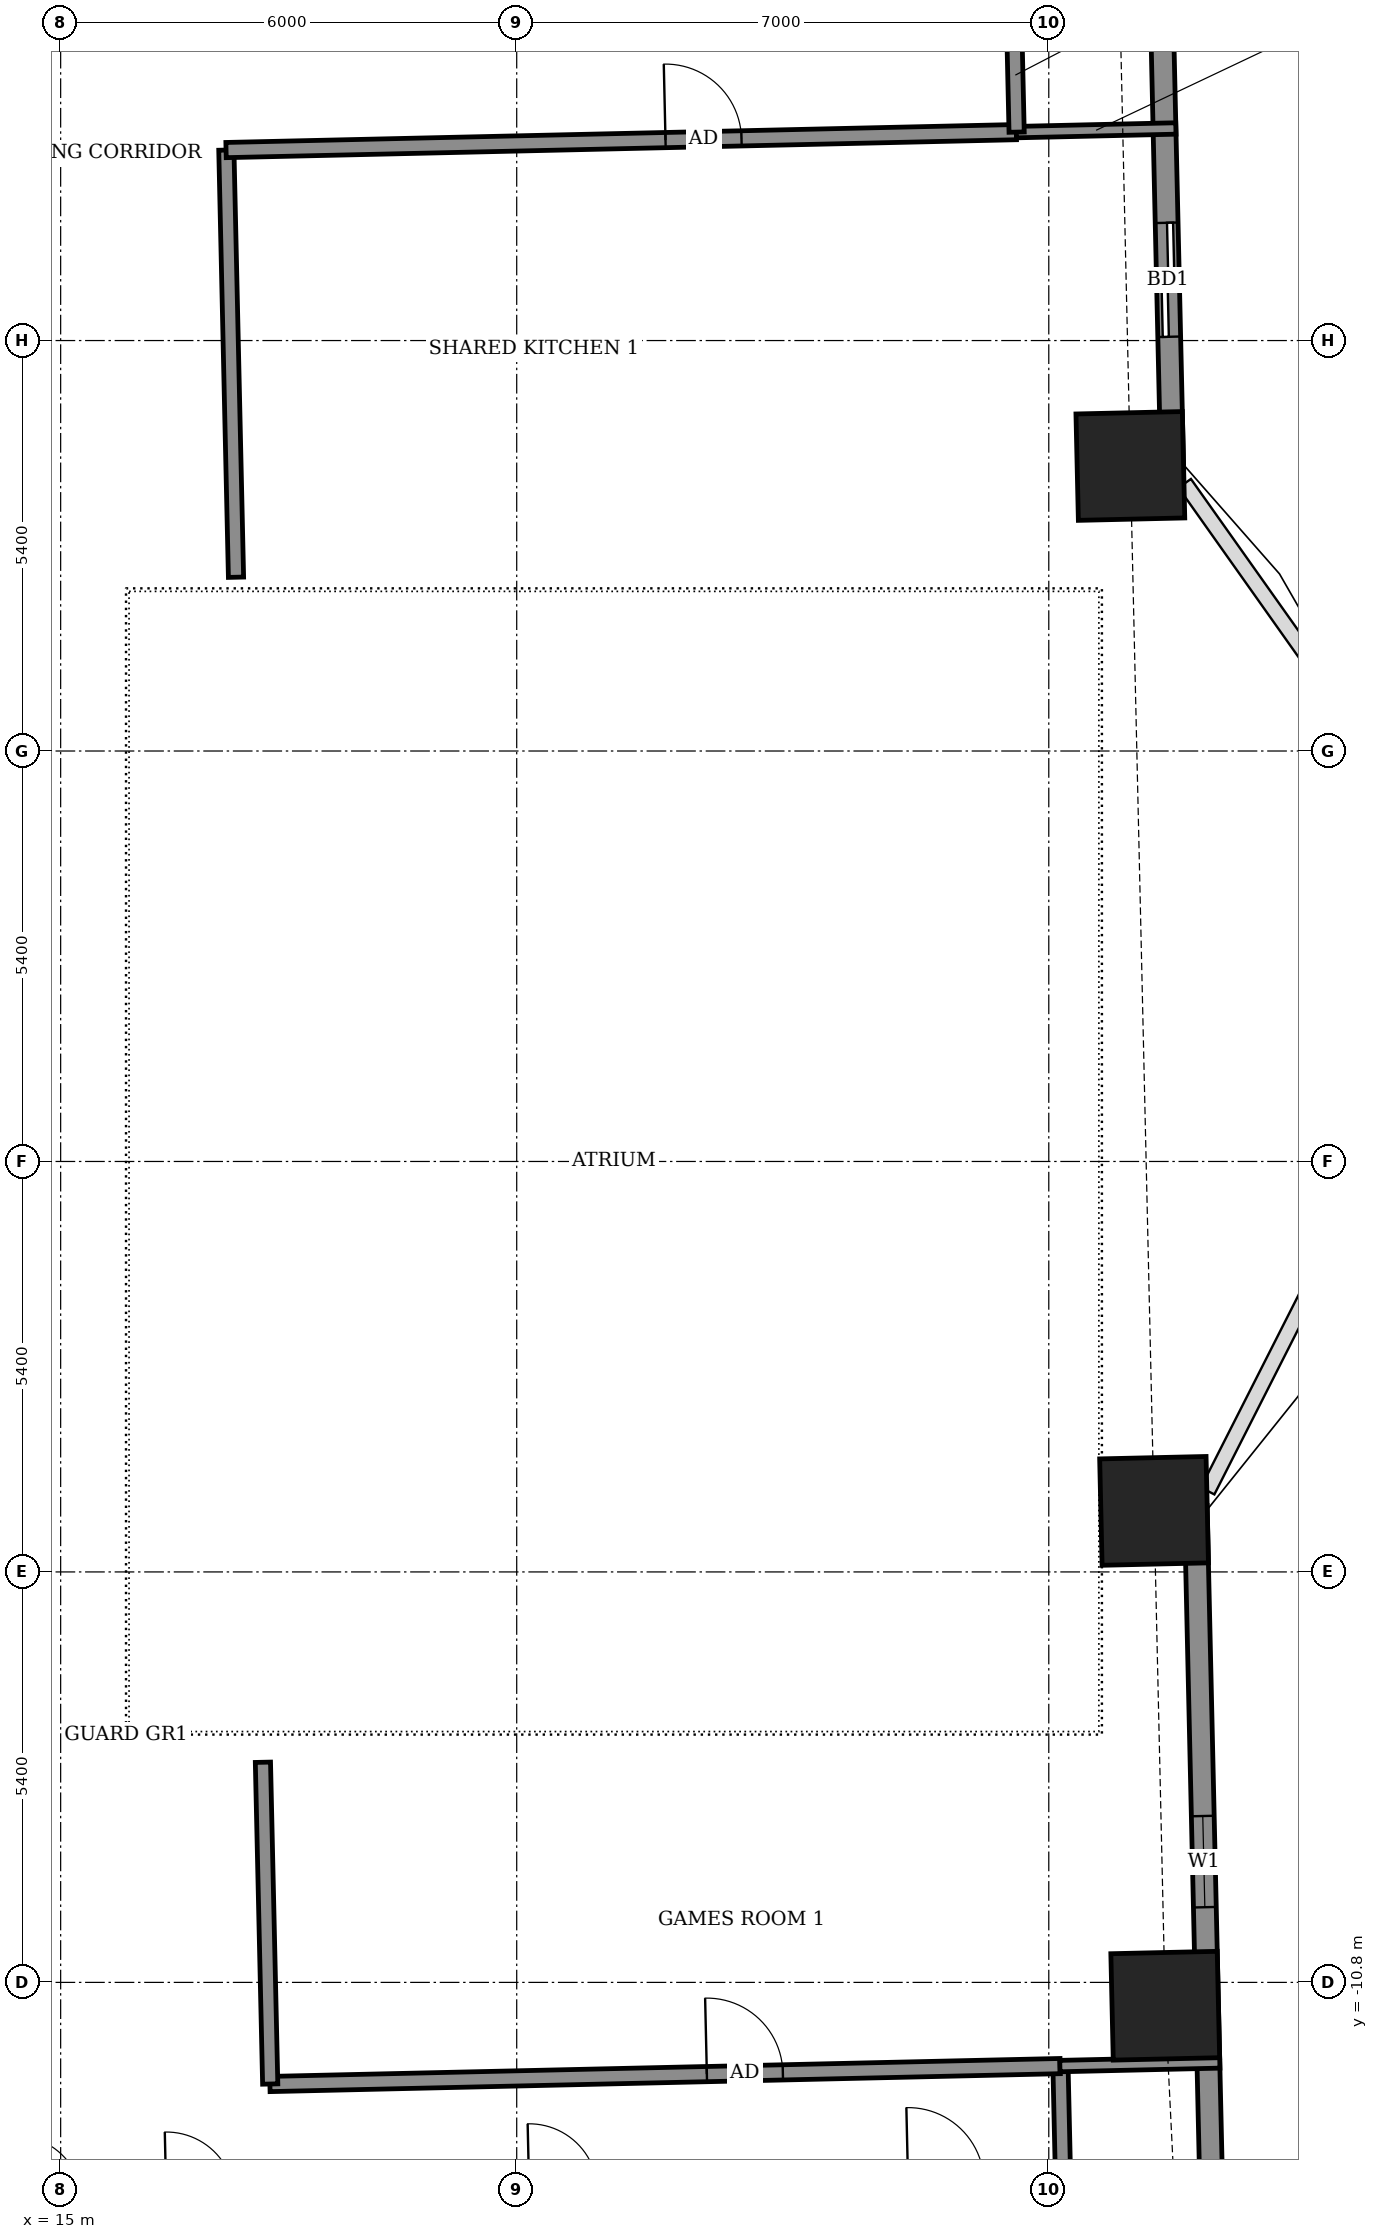
"""IFC4 building model, lengths in metres.
Left out: names, types, materials, properties, quantities, classifications, styles, units other than length and angle.
Written with IfcOpenShell. Run it as: python <this file> out.ifc"""

import sys

from ifc_helpers import new_model, si_unit, direction, frame, frame_2d, origin, origin_2d, place, context, subcontext, project, spatial, rectangle, extrude, element, fill, save


model = new_model("IFC4")
c1 = context("Model", 3, precision=1e-05, world=origin(), true_north=direction((0.0, 1.0)))
c2 = subcontext(c1, "Body", "Model", "MODEL_VIEW")
j1 = project(units=[si_unit("LENGTHUNIT", "METRE"), si_unit("PLANEANGLEUNIT", "RADIAN")], contexts=[c1])
p1 = place(None, origin())
s1 = spatial("IfcSite", under=j1, at=p1, CompositionType="ELEMENT")
p2 = place(p1, origin())
s2 = spatial("IfcBuilding", under=s1, at=p2, CompositionType="ELEMENT")
p3 = place(p2, frame((0.0, 0.0, 90.1)))
s3 = spatial("IfcBuildingStorey", under=s2, at=p3, CompositionType="ELEMENT", Elevation=90.1)
for number, where, z_axis, x_axis in (
    (1, (29.532, -11.107, -0.55), (0.0, 0.0, 1.0), (-0.023, 1.0, 0.0)),
    (2, (29.385, -4.597, -0.55), (0.0, 0.0, 1.0), (-0.023, 1.0, 0.0)),
    (3, (29.073, 9.15, -0.55), (0.0, 0.0, 1.0), (-0.023, 1.0, 0.0)),
):
    element("IfcColumn", number, at=place(p3, frame(where, z_axis=z_axis, x_axis=x_axis)), inside=s3, PredefinedType="COLUMN", context=c2, shape_type="SweptSolid", body=[
        extrude(rectangle(XDim=1.4, YDim=1.4, at=origin_2d()), origin(), (0.0, 0.0, 1.0), 3.6),
    ])
p4 = place(p3, frame((30.227, -17.455, 0.0), z_axis=(0.0, 0.0, 1.0), x_axis=(-0.022734702163, 0.999741533256, 0.0)))
e4 = element("IfcWall", 4, at=p4, inside=s3, PredefinedType="SOLIDWALL", context=c2, shape_type="SweptSolid", body=[
    extrude(rectangle(XDim=12.929, YDim=0.3, at=frame_2d((6.465, 0.0))), origin(), (0.0, 0.0, 1.0), 3.05),
])
p5 = place(p4, frame((2.566, 0.0, 0.0)))
e5 = element("IfcOpeningElement", 5, at=p5, cuts=e4, PredefinedType="OPENING", context=c2, shape_type="SweptSolid", body=[
    extrude(rectangle(XDim=1.5, YDim=2.4, at=frame_2d((0.75, 1.2))), frame((0.0, 0.16, 0.0), z_axis=(0.0, -1.0, 0.0), x_axis=(1.0, 0.0, 0.0)), (0.0, 0.0, 1.0), 0.32),
])
p6 = place(p4, frame((7.646, 0.0, 0.9)))
e6 = element("IfcOpeningElement", 6, at=p6, cuts=e4, PredefinedType="OPENING", context=c2, shape_type="SweptSolid", body=[
    extrude(rectangle(XDim=1.2, YDim=1.5, at=frame_2d((0.6, 0.75))), frame((0.0, 0.16, 0.0), z_axis=(0.0, -1.0, 0.0), x_axis=(1.0, 0.0, 0.0)), (0.0, 0.0, 1.0), 0.32),
])
p7 = place(p3, frame((29.624, 9.108, 0.0), z_axis=(0.0, 0.0, 1.0), x_axis=(-0.022679601751, 0.999742784752, 0.0)))
e7 = element("IfcWall", 7, at=p7, inside=s3, PredefinedType="SOLIDWALL", context=c2, shape_type="SweptSolid", body=[
    extrude(rectangle(XDim=13.93, YDim=0.3, at=frame_2d((6.965, 0.0))), origin(), (0.0, 0.0, 1.0), 3.05),
])
p8 = place(p7, frame((1.742, 0.0, 0.0)))
e8 = element("IfcOpeningElement", 8, at=p8, cuts=e7, PredefinedType="OPENING", context=c2, shape_type="SweptSolid", body=[
    extrude(rectangle(XDim=1.5, YDim=2.4, at=frame_2d((0.75, 1.2))), frame((0.0, 0.16, 0.0), z_axis=(0.0, -1.0, 0.0), x_axis=(1.0, 0.0, 0.0)), (0.0, 0.0, 1.0), 0.32),
])
p9 = place(p7, frame((9.054, 0.0, 0.9)))
e9 = element("IfcOpeningElement", 9, at=p9, cuts=e7, PredefinedType="OPENING", context=c2, shape_type="SweptSolid", body=[
    extrude(rectangle(XDim=2.4, YDim=1.5, at=frame_2d((1.2, 0.75))), frame((0.0, 0.16, 0.0), z_axis=(0.0, -1.0, 0.0), x_axis=(1.0, 0.0, 0.0)), (0.0, 0.0, 1.0), 0.32),
])
p10 = place(p3, frame((28.188, -13.401, 0.0), z_axis=(0.0, 0.0, 1.0), x_axis=(-0.022617910375, 0.999744182344, 0.0)))
e10 = element("IfcWall", 10, at=p10, inside=s3, PredefinedType="PARTITIONING", context=c2, shape_type="SweptSolid", body=[
    extrude(rectangle(XDim=1.5, YDim=0.2, at=frame_2d((0.75, 0.0))), origin(), (0.0, 0.0, 1.0), 3.05),
])
p11 = place(p3, frame((17.753, -12.137, 0.0), z_axis=(0.0, 0.0, 1.0), x_axis=(0.999742295888, 0.022701141223, 0.0)))
e11 = element("IfcWall", 11, at=p11, inside=s3, PredefinedType="PARTITIONING", context=c2, shape_type="SweptSolid", body=[
    extrude(rectangle(XDim=10.4, YDim=0.2, at=frame_2d((5.2, 0.0))), origin(), (0.0, 0.0, 1.0), 3.05),
])
p12 = place(p11, frame((5.75, 0.0, 0.0)))
e12 = element("IfcOpeningElement", 12, at=p12, cuts=e11, PredefinedType="OPENING", context=c2, shape_type="SweptSolid", body=[
    extrude(rectangle(XDim=1.0, YDim=2.1, at=frame_2d((0.5, 1.05))), frame((0.0, 0.11, 0.0), z_axis=(0.0, -1.0, 0.0), x_axis=(1.0, 0.0, 0.0)), (0.0, 0.0, 1.0), 0.22),
])
p13 = place(p3, frame((17.757, -12.137, 0.0), z_axis=(0.0, 0.0, 1.0), x_axis=(-0.022718785711, 0.999741895079, 0.0)))
e13 = element("IfcWall", 13, at=p13, inside=s3, PredefinedType="PARTITIONING", context=c2, shape_type="SweptSolid", body=[
    extrude(rectangle(XDim=4.234, YDim=0.2, at=frame_2d((2.117, 0.0))), origin(), (0.0, 0.0, 1.0), 3.05),
])
p14 = place(p3, frame((28.146, -11.901, 0.0), z_axis=(0.0, 0.0, 1.0), x_axis=(0.999741476082, 0.022737216212, 0.0)))
e14 = element("IfcWall", 14, at=p14, inside=s3, PredefinedType="PARTITIONING", context=c2, shape_type="SweptSolid", body=[
    extrude(rectangle(XDim=2.104, YDim=0.15, at=frame_2d((1.052, 0.0))), origin(), (0.0, 0.0, 1.0), 2.55),
])
p15 = place(p3, frame((17.307, 7.686, 0.0), z_axis=(0.0, 0.0, 1.0), x_axis=(-0.022584272568, 0.999744942789, 0.0)))
e15 = element("IfcWall", 15, at=p15, inside=s3, PredefinedType="PARTITIONING", context=c2, shape_type="SweptSolid", body=[
    extrude(rectangle(XDim=5.621, YDim=0.2, at=frame_2d((2.811, 0.0))), origin(), (0.0, 0.0, 1.0), 3.05),
])
p16 = place(p3, frame((17.176, 13.306, 0.0), z_axis=(0.0, 0.0, 1.0), x_axis=(0.999742295888, 0.022701141223, 0.0)))
e16 = element("IfcWall", 16, at=p16, inside=s3, PredefinedType="PARTITIONING", context=c2, shape_type="SweptSolid", body=[
    extrude(rectangle(XDim=10.4, YDim=0.2, at=frame_2d((5.2, 0.0))), origin(), (0.0, 0.0, 1.0), 3.05),
])
p17 = place(p16, frame((5.783, 0.0, 0.0)))
e17 = element("IfcOpeningElement", 17, at=p17, cuts=e16, PredefinedType="OPENING", context=c2, shape_type="SweptSolid", body=[
    extrude(rectangle(XDim=1.0, YDim=2.1, at=frame_2d((0.5, 1.05))), frame((0.0, 0.11, 0.0), z_axis=(0.0, -1.0, 0.0), x_axis=(1.0, 0.0, 0.0)), (0.0, 0.0, 1.0), 0.22),
])
p18 = place(p3, frame((27.573, 13.542, 0.0), z_axis=(0.0, 0.0, 1.0), x_axis=(0.999737616439, 0.022906293375, 0.0)))
e18 = element("IfcWall", 18, at=p18, inside=s3, PredefinedType="PARTITIONING", context=c2, shape_type="SweptSolid", body=[
    extrude(rectangle(XDim=2.1, YDim=0.15, at=frame_2d((1.05, 0.0))), origin(), (0.0, 0.0, 1.0), 2.55),
])
p19 = place(p3, frame((27.577, 13.542, 0.0), z_axis=(0.0, 0.0, 1.0), x_axis=(-0.022617910375, 0.999744182344, 0.0)))
e19 = element("IfcWall", 19, at=p19, inside=s3, PredefinedType="PARTITIONING", context=c2, shape_type="SweptSolid", body=[
    extrude(rectangle(XDim=1.5, YDim=0.2, at=frame_2d((0.75, 0.0))), origin(), (0.0, 0.0, 1.0), 3.05),
])
p20 = place(p3, frame((-24.92, 13.851, 0.0), z_axis=(0.0, 0.0, 1.0), x_axis=(0.999742411711, 0.022696039895, 0.0)))
e20 = element("IfcWall", 20, at=p20, inside=s3, PredefinedType="PARTITIONING", context=c2, shape_type="SweptSolid", body=[
    extrude(rectangle(XDim=52.472, YDim=0.2, at=frame_2d((26.236, 0.0))), origin(), (0.0, 0.0, 1.0), 3.05),
])
p21 = place(p20, frame((50.088, 0.0, 0.0)))
e21 = element("IfcOpeningElement", 21, at=p21, cuts=e20, PredefinedType="OPENING", context=c2, shape_type="SweptSolid", body=[
    extrude(rectangle(XDim=1.0, YDim=2.1, at=frame_2d((0.5, 1.05))), frame((0.0, 0.11, 0.0), z_axis=(0.0, -1.0, 0.0), x_axis=(1.0, 0.0, 0.0)), (0.0, 0.0, 1.0), 0.22),
])
p22 = place(p20, frame((45.725, 0.0, 0.0)))
e22 = element("IfcOpeningElement", 22, at=p22, cuts=e20, PredefinedType="OPENING", context=c2, shape_type="SweptSolid", body=[
    extrude(rectangle(XDim=0.9, YDim=2.1, at=frame_2d((0.45, 1.05))), frame((0.0, 0.11, 0.0), z_axis=(0.0, -1.0, 0.0), x_axis=(1.0, 0.0, 0.0)), (0.0, 0.0, 1.0), 0.22),
])
p23 = place(p20, frame((38.975, 0.0, 0.0)))
e23 = element("IfcOpeningElement", 23, at=p23, cuts=e20, PredefinedType="OPENING", context=c2, shape_type="SweptSolid", body=[
    extrude(rectangle(XDim=0.9, YDim=2.1, at=frame_2d((0.45, 1.05))), frame((0.0, 0.11, 0.0), z_axis=(0.0, -1.0, 0.0), x_axis=(1.0, 0.0, 0.0)), (0.0, 0.0, 1.0), 0.22),
])
p24 = place(p20, frame((37.05, 0.0, 0.0)))
e24 = element("IfcOpeningElement", 24, at=p24, cuts=e20, PredefinedType="OPENING", context=c2, shape_type="SweptSolid", body=[
    extrude(rectangle(XDim=0.9, YDim=2.1, at=frame_2d((0.45, 1.05))), frame((0.0, 0.11, 0.0), z_axis=(0.0, -1.0, 0.0), x_axis=(1.0, 0.0, 0.0)), (0.0, 0.0, 1.0), 0.22),
])
p25 = place(p20, frame((30.35, 0.0, 0.0)))
e25 = element("IfcOpeningElement", 25, at=p25, cuts=e20, PredefinedType="OPENING", context=c2, shape_type="SweptSolid", body=[
    extrude(rectangle(XDim=0.9, YDim=2.1, at=frame_2d((0.45, 1.05))), frame((0.0, 0.11, 0.0), z_axis=(0.0, -1.0, 0.0), x_axis=(1.0, 0.0, 0.0)), (0.0, 0.0, 1.0), 0.22),
])
p26 = place(p20, frame((28.4, 0.0, 0.0)))
e26 = element("IfcOpeningElement", 26, at=p26, cuts=e20, PredefinedType="OPENING", context=c2, shape_type="SweptSolid", body=[
    extrude(rectangle(XDim=0.9, YDim=2.1, at=frame_2d((0.45, 1.05))), frame((0.0, 0.11, 0.0), z_axis=(0.0, -1.0, 0.0), x_axis=(1.0, 0.0, 0.0)), (0.0, 0.0, 1.0), 0.22),
])
p27 = place(p20, frame((21.675, 0.0, 0.0)))
e27 = element("IfcOpeningElement", 27, at=p27, cuts=e20, PredefinedType="OPENING", context=c2, shape_type="SweptSolid", body=[
    extrude(rectangle(XDim=0.9, YDim=2.1, at=frame_2d((0.45, 1.05))), frame((0.0, 0.11, 0.0), z_axis=(0.0, -1.0, 0.0), x_axis=(1.0, 0.0, 0.0)), (0.0, 0.0, 1.0), 0.22),
])
p28 = place(p20, frame((19.775, 0.0, 0.0)))
e28 = element("IfcOpeningElement", 28, at=p28, cuts=e20, PredefinedType="OPENING", context=c2, shape_type="SweptSolid", body=[
    extrude(rectangle(XDim=0.9, YDim=2.1, at=frame_2d((0.45, 1.05))), frame((0.0, 0.11, 0.0), z_axis=(0.0, -1.0, 0.0), x_axis=(1.0, 0.0, 0.0)), (0.0, 0.0, 1.0), 0.22),
])
p29 = place(p20, frame((13.0, 0.0, 0.0)))
e29 = element("IfcOpeningElement", 29, at=p29, cuts=e20, PredefinedType="OPENING", context=c2, shape_type="SweptSolid", body=[
    extrude(rectangle(XDim=0.9, YDim=2.1, at=frame_2d((0.45, 1.05))), frame((0.0, 0.11, 0.0), z_axis=(0.0, -1.0, 0.0), x_axis=(1.0, 0.0, 0.0)), (0.0, 0.0, 1.0), 0.22),
])
p30 = place(p20, frame((11.075, 0.0, 0.0)))
e30 = element("IfcOpeningElement", 30, at=p30, cuts=e20, PredefinedType="OPENING", context=c2, shape_type="SweptSolid", body=[
    extrude(rectangle(XDim=0.9, YDim=2.1, at=frame_2d((0.45, 1.05))), frame((0.0, 0.11, 0.0), z_axis=(0.0, -1.0, 0.0), x_axis=(1.0, 0.0, 0.0)), (0.0, 0.0, 1.0), 0.22),
])
p31 = place(p20, frame((3.049, 0.0, 0.0)))
e31 = element("IfcOpeningElement", 31, at=p31, cuts=e20, PredefinedType="OPENING", context=c2, shape_type="SweptSolid", body=[
    extrude(rectangle(XDim=1.0, YDim=2.1, at=frame_2d((0.5, 1.05))), frame((0.0, 0.11, 0.0), z_axis=(0.0, -1.0, 0.0), x_axis=(1.0, 0.0, 0.0)), (0.0, 0.0, 1.0), 0.22),
])
p32 = place(p6, origin())
e32 = element("IfcWindow", 32, at=p32, inside=s3, PartitioningType="SINGLE_PANEL", PredefinedType="WINDOW", context=c2, shape_type="SweptSolid", body=[
    extrude(rectangle(XDim=1.2, YDim=1.5, at=frame_2d((0.6, 0.75))), frame((0.0, 0.03, 0.0), z_axis=(0.0, -1.0, 0.0), x_axis=(1.0, 0.0, 0.0)), (0.0, 0.0, 1.0), 0.06),
])
fill(e6, e32)
p33 = place(p8, origin())
e33 = element("IfcDoor", 33, at=p33, inside=s3, OperationType="SLIDING_TO_LEFT", PredefinedType="DOOR", context=c2, shape_type="SweptSolid", body=[
    extrude(rectangle(XDim=1.5, YDim=2.4, at=frame_2d((0.75, 1.2))), frame((0.0, 0.025, 0.0), z_axis=(0.0, -1.0, 0.0), x_axis=(1.0, 0.0, 0.0)), (0.0, 0.0, 1.0), 0.05),
])
fill(e8, e33)
p34 = place(p12, origin())
e34 = element("IfcDoor", 34, at=p34, inside=s3, OperationType="SINGLE_SWING_LEFT", PredefinedType="DOOR", context=c2, shape_type="SweptSolid", body=[
    extrude(rectangle(XDim=1.0, YDim=2.1, at=frame_2d((0.5, 1.05))), frame((0.0, 0.025, 0.0), z_axis=(0.0, -1.0, 0.0), x_axis=(1.0, 0.0, 0.0)), (0.0, 0.0, 1.0), 0.05),
])
fill(e12, e34)
p35 = place(p17, origin())
e35 = element("IfcDoor", 35, at=p35, inside=s3, OperationType="SINGLE_SWING_RIGHT", PredefinedType="DOOR", context=c2, shape_type="SweptSolid", body=[
    extrude(rectangle(XDim=1.0, YDim=2.1, at=frame_2d((0.5, 1.05))), frame((0.0, 0.025, 0.0), z_axis=(0.0, -1.0, 0.0), x_axis=(1.0, 0.0, 0.0)), (0.0, 0.0, 1.0), 0.05),
])
fill(e17, e35)
save(model, sys.argv[1])
